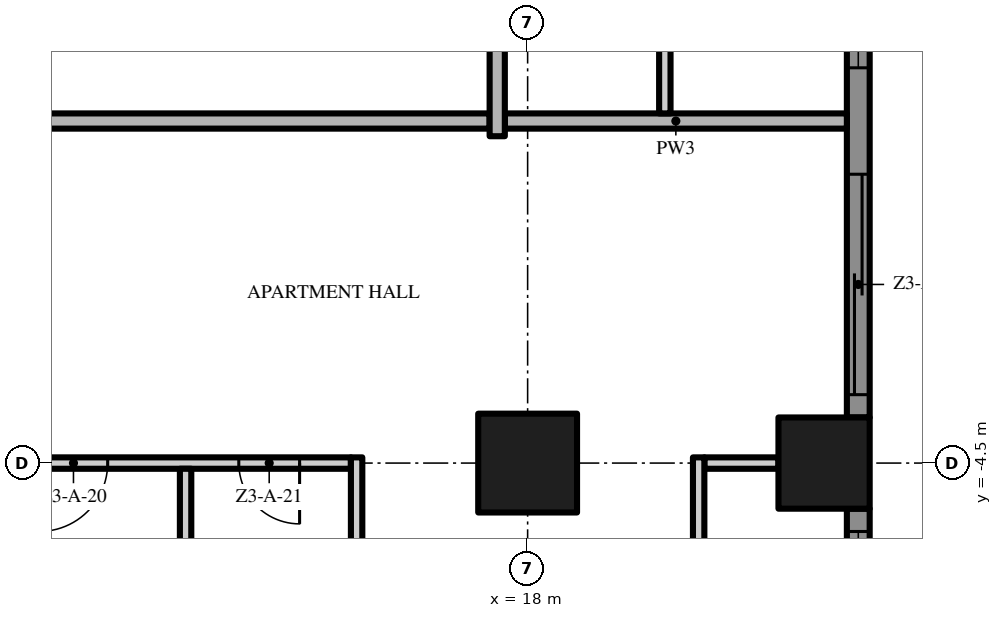
"""IFC4 building model, lengths in metres.
Left out: names, types, materials, properties, quantities, classifications, styles, units other than length and angle.
Written with IfcOpenShell. Run it as: python <this file> out.ifc"""

import sys

from ifc_helpers import new_model, si_unit, direction, frame, frame_2d, origin, origin_2d, place, context, subcontext, project, spatial, polyline, rectangle, outline, extrude, element, fill, save


model = new_model("IFC4")
c1 = context("Model", 3, precision=1e-05, world=origin(), true_north=direction((0.0, 1.0)))
c2 = subcontext(c1, "Body", "Model", "MODEL_VIEW")
j1 = project(units=[si_unit("LENGTHUNIT", "METRE"), si_unit("PLANEANGLEUNIT", "RADIAN")], contexts=[c1])
p1 = place(None, origin())
s1 = spatial("IfcSite", under=j1, at=p1, CompositionType="ELEMENT")
p2 = place(p1, origin())
s2 = spatial("IfcBuilding", under=s1, at=p2, CompositionType="ELEMENT")
p3 = place(p2, frame((0.0, 0.0, 128.8)))
s3 = spatial("IfcBuildingStorey", under=s2, at=p3, CompositionType="ELEMENT", Elevation=128.8)
p4 = place(p3, frame((18.0, -4.5, 0.0), z_axis=(0.0, 0.0, 1.0), x_axis=(1.0, 0.0, 0.0)))
e1 = element("IfcColumn", 1, at=p4, inside=s3, PredefinedType="COLUMN", context=c2, shape_type="SweptSolid", body=[
    extrude(rectangle(XDim=1.3, YDim=1.3, at=origin_2d()), origin(), (0.0, 0.0, 1.0), 3.5),
])
p5 = place(p3, frame((21.9, -4.5, 0.0), z_axis=(0.0, 0.0, 1.0), x_axis=(1.0, 0.0, 0.0)))
e2 = element("IfcColumn", 2, at=p5, inside=s3, PredefinedType="COLUMN", context=c2, shape_type="SweptSolid", body=[
    extrude(rectangle(XDim=1.2, YDim=1.2, at=origin_2d()), origin(), (0.0, 0.0, 1.0), 3.5),
])
p6 = place(p3, frame((22.35, -5.1, 0.0), z_axis=(0.0, 0.0, 1.0), x_axis=(0.0, -1.0, 0.0)))
e3 = element("IfcWall", 3, at=p6, inside=s3, PredefinedType="SOLIDWALL", context=c2, shape_type="SweptSolid", body=[
    extrude(rectangle(XDim=7.2, YDim=0.3, at=frame_2d((3.6, 0.0))), origin(), (0.0, 0.0, 1.0), 3.5),
])
p7 = place(p6, frame((4.6, 0.0, 0.45)))
e4 = element("IfcOpeningElement", 4, at=p7, cuts=e3, PredefinedType="OPENING", context=c2, shape_type="SweptSolid", body=[
    extrude(rectangle(XDim=2.3, YDim=2.65, at=frame_2d((1.15, 1.325))), frame((0.0, 0.16, 0.0), z_axis=(0.0, -1.0, 0.0), x_axis=(1.0, 0.0, 0.0)), (0.0, 0.0, 1.0), 0.32),
])
p8 = place(p6, frame((0.3, 0.0, 0.45)))
e5 = element("IfcOpeningElement", 5, at=p8, cuts=e3, PredefinedType="OPENING", context=c2, shape_type="SweptSolid", body=[
    extrude(rectangle(XDim=2.9, YDim=2.65, at=frame_2d((1.45, 1.325))), frame((0.0, 0.16, 0.0), z_axis=(0.0, -1.0, 0.0), x_axis=(1.0, 0.0, 0.0)), (0.0, 0.0, 1.0), 0.32),
])
p9 = place(p3, frame((22.35, 3.9, 0.0), z_axis=(0.0, 0.0, 1.0), x_axis=(0.0, -1.0, 0.0)))
e6 = element("IfcWall", 6, at=p9, inside=s3, PredefinedType="SOLIDWALL", context=c2, shape_type="SweptSolid", body=[
    extrude(rectangle(XDim=7.8, YDim=0.3, at=frame_2d((3.9, 0.0))), origin(), (0.0, 0.0, 1.0), 3.5),
])
p10 = place(p9, frame((4.6, 0.0, 0.0)))
e7 = element("IfcOpeningElement", 7, at=p10, cuts=e6, PredefinedType="OPENING", context=c2, shape_type="SweptSolid", body=[
    extrude(rectangle(XDim=2.9, YDim=2.4, at=frame_2d((1.45, 1.2))), frame((0.0, 0.16, 0.0), z_axis=(0.0, -1.0, 0.0), x_axis=(1.0, 0.0, 0.0)), (0.0, 0.0, 1.0), 0.32),
])
p11 = place(p9, frame((0.3, 0.0, 0.45)))
e8 = element("IfcOpeningElement", 8, at=p11, cuts=e6, PredefinedType="OPENING", context=c2, shape_type="SweptSolid", body=[
    extrude(rectangle(XDim=2.9, YDim=2.65, at=frame_2d((1.45, 1.325))), frame((0.0, 0.16, 0.0), z_axis=(0.0, -1.0, 0.0), x_axis=(1.0, 0.0, 0.0)), (0.0, 0.0, 1.0), 0.32),
])
p12 = place(p3, origin())
e9 = element("IfcWall", 9, at=p12, inside=s3, PredefinedType="USERDEFINED", context=c2, shape_type="SweptSolid", body=[
    extrude(outline(polyline([(24.3, -13.5), (23.595, -12.0), (23.159, -10.5), (23.1, -9.75), (23.159, -9.0), (23.595, -7.5), (24.3, -6.0), (25.005, -4.5), (25.441, -3.0), (25.5, -2.25), (25.441, -1.5), (25.005, 0.0), (24.3, 1.5), (23.595, 3.0), (23.159, 4.5), (23.1, 5.25), (23.159, 6.0), (23.595, 7.5), (24.3, 9.0), (25.005, 10.5), (25.441, 12.0), (25.5, 12.75), (25.441, 13.5), (25.005, 15.0), (24.3, 16.5), (23.595, 18.0), (23.368, 17.894), (24.074, 16.394), (24.771, 14.911), (25.194, 13.455), (25.249, 12.75), (25.194, 12.045), (24.771, 10.589), (24.074, 9.106), (23.36, 7.589), (22.911, 6.045), (22.849, 5.25), (22.911, 4.455), (23.36, 2.911), (24.074, 1.394), (24.771, -0.089), (25.194, -1.545), (25.249, -2.25), (25.194, -2.955), (24.771, -4.411), (24.074, -5.894), (23.36, -7.411), (22.911, -8.955), (22.849, -9.75), (22.911, -10.545), (23.36, -12.089), (24.074, -13.606), (24.3, -13.5)])), origin(), (0.0, 0.0, 1.0), 0.9),
])
p13 = place(p3, frame((15.675, -4.5, 0.0), z_axis=(0.0, 0.0, 1.0), x_axis=(-1.0, 0.0, 0.0)))
e10 = element("IfcWall", 10, at=p13, inside=s3, PredefinedType="PARTITIONING", context=c2, shape_type="SweptSolid", body=[
    extrude(rectangle(XDim=4.35, YDim=0.15, at=frame_2d((2.175, 0.0))), origin(), (0.0, 0.0, 1.0), 3.5),
])
p14 = place(p13, frame((3.2, 0.0, 0.0)))
e11 = element("IfcOpeningElement", 11, at=p14, cuts=e10, PredefinedType="OPENING", context=c2, shape_type="SweptSolid", body=[
    extrude(rectangle(XDim=0.9, YDim=2.1, at=frame_2d((0.45, 1.05))), frame((0.0, 0.085, 0.0), z_axis=(0.0, -1.0, 0.0), x_axis=(1.0, 0.0, 0.0)), (0.0, 0.0, 1.0), 0.17),
])
p15 = place(p13, frame((0.675, 0.0, 0.0)))
e12 = element("IfcOpeningElement", 12, at=p15, cuts=e10, PredefinedType="OPENING", context=c2, shape_type="SweptSolid", body=[
    extrude(rectangle(XDim=0.8, YDim=2.0, at=frame_2d((0.4, 1.0))), frame((0.0, 0.085, 0.0), z_axis=(0.0, -1.0, 0.0), x_axis=(1.0, 0.0, 0.0)), (0.0, 0.0, 1.0), 0.17),
])
p16 = place(p3, frame((20.325, -4.5, 0.0), z_axis=(0.0, 0.0, 1.0), x_axis=(1.0, 0.0, 0.0)))
e13 = element("IfcWall", 13, at=p16, inside=s3, PredefinedType="PARTITIONING", context=c2, shape_type="SweptSolid", body=[
    extrude(rectangle(XDim=0.975, YDim=0.15, at=frame_2d((0.487, 0.0))), origin(), (0.0, 0.0, 1.0), 3.5),
])
p17 = place(p3, frame((17.5, 0.0, 0.0), z_axis=(0.0, 0.0, 1.0), x_axis=(-1.0, 0.0, 0.0)))
e14 = element("IfcWall", 14, at=p17, inside=s3, PredefinedType="PARTITIONING", context=c2, shape_type="SweptSolid", body=[
    extrude(rectangle(XDim=35.0, YDim=0.2, at=frame_2d((17.5, 0.0))), origin(), (0.0, 0.0, 1.0), 3.5),
])
p18 = place(p17, frame((16.75, 0.0, 0.0)))
e15 = element("IfcOpeningElement", 15, at=p18, cuts=e14, PredefinedType="OPENING", context=c2, shape_type="SweptSolid", body=[
    extrude(rectangle(XDim=1.5, YDim=2.4, at=frame_2d((0.75, 1.2))), frame((0.0, 0.11, 0.0), z_axis=(0.0, -1.0, 0.0), x_axis=(1.0, 0.0, 0.0)), (0.0, 0.0, 1.0), 0.22),
])
p19 = place(p3, frame((17.7, 0.0, 0.0), z_axis=(0.0, 0.0, 1.0), x_axis=(1.0, 0.0, 0.0)))
e16 = element("IfcWall", 16, at=p19, inside=s3, PredefinedType="PARTITIONING", context=c2, shape_type="SweptSolid", body=[
    extrude(rectangle(XDim=4.5, YDim=0.2, at=frame_2d((2.25, 0.0))), origin(), (0.0, 0.0, 1.0), 3.5),
])
p20 = place(p3, frame((13.5, -17.7, 0.0), z_axis=(0.0, 0.0, 1.0), x_axis=(0.0, 1.0, 0.0)))
e17 = element("IfcWall", 17, at=p20, inside=s3, PredefinedType="PARTITIONING", context=c2, shape_type="SweptSolid", body=[
    extrude(rectangle(XDim=13.125, YDim=0.15, at=frame_2d((6.562, 0.0))), origin(), (0.0, 0.0, 1.0), 3.5),
])
p21 = place(p3, frame((15.75, -12.075, 0.0), z_axis=(0.0, 0.0, 1.0), x_axis=(0.0, 1.0, 0.0)))
e18 = element("IfcWall", 18, at=p21, inside=s3, PredefinedType="PARTITIONING", context=c2, shape_type="SweptSolid", body=[
    extrude(rectangle(XDim=7.65, YDim=0.15, at=frame_2d((3.825, 0.0))), origin(), (0.0, 0.0, 1.0), 3.5),
])
p22 = place(p3, frame((17.6, -0.2, 0.0), z_axis=(0.0, 0.0, 1.0), x_axis=(0.0, 1.0, 0.0)))
e19 = element("IfcWall", 19, at=p22, inside=s3, PredefinedType="PARTITIONING", context=c2, shape_type="SweptSolid", body=[
    extrude(rectangle(XDim=4.05, YDim=0.2, at=frame_2d((2.025, 0.0))), origin(), (0.0, 0.0, 1.0), 3.5),
])
p23 = place(p3, frame((19.805, 0.1, 0.0), z_axis=(0.0, 0.0, 1.0), x_axis=(0.0, 1.0, 0.0)))
e20 = element("IfcWall", 20, at=p23, inside=s3, PredefinedType="PARTITIONING", context=c2, shape_type="SweptSolid", body=[
    extrude(rectangle(XDim=2.225, YDim=0.15, at=frame_2d((1.113, 0.0))), origin(), (0.0, 0.0, 1.0), 3.5),
])
p24 = place(p3, frame((20.25, -4.425, 0.0), z_axis=(0.0, 0.0, 1.0), x_axis=(0.0, -1.0, 0.0)))
e21 = element("IfcWall", 21, at=p24, inside=s3, PredefinedType="PARTITIONING", context=c2, shape_type="SweptSolid", body=[
    extrude(rectangle(XDim=4.5, YDim=0.15, at=frame_2d((2.25, 0.0))), origin(), (0.0, 0.0, 1.0), 3.5),
])
p25 = place(p24, frame((1.95, 0.0, 0.0)))
e22 = element("IfcOpeningElement", 22, at=p25, cuts=e21, PredefinedType="OPENING", context=c2, shape_type="SweptSolid", body=[
    extrude(rectangle(XDim=0.8, YDim=2.0, at=frame_2d((0.4, 1.0))), frame((0.0, 0.085, 0.0), z_axis=(0.0, -1.0, 0.0), x_axis=(1.0, 0.0, 0.0)), (0.0, 0.0, 1.0), 0.17),
])
p26 = place(p8, origin())
e23 = element("IfcWindow", 23, at=p26, inside=s3, PartitioningType="SINGLE_PANEL", PredefinedType="WINDOW", context=c2, shape_type="SweptSolid", body=[
    extrude(rectangle(XDim=2.9, YDim=2.65, at=frame_2d((1.45, 1.325))), frame((0.0, 0.03, 0.0), z_axis=(0.0, -1.0, 0.0), x_axis=(1.0, 0.0, 0.0)), (0.0, 0.0, 1.0), 0.06),
])
fill(e5, e23)
p27 = place(p10, origin())
e24 = element("IfcDoor", 24, at=p27, inside=s3, OperationType="SINGLE_SWING_LEFT", PredefinedType="DOOR", context=c2, shape_type="SweptSolid", body=[
    extrude(rectangle(XDim=2.9, YDim=2.4, at=frame_2d((1.45, 1.2))), frame((0.0, 0.025, 0.0), z_axis=(0.0, -1.0, 0.0), x_axis=(1.0, 0.0, 0.0)), (0.0, 0.0, 1.0), 0.05),
])
fill(e7, e24)
p28 = place(p11, origin())
e25 = element("IfcWindow", 25, at=p28, inside=s3, PartitioningType="SINGLE_PANEL", PredefinedType="WINDOW", context=c2, shape_type="SweptSolid", body=[
    extrude(rectangle(XDim=2.9, YDim=2.65, at=frame_2d((1.45, 1.325))), frame((0.0, 0.03, 0.0), z_axis=(0.0, -1.0, 0.0), x_axis=(1.0, 0.0, 0.0)), (0.0, 0.0, 1.0), 0.06),
])
fill(e8, e25)
p29 = place(p14, origin())
e26 = element("IfcDoor", 26, at=p29, inside=s3, OperationType="SINGLE_SWING_RIGHT", PredefinedType="DOOR", context=c2, shape_type="SweptSolid", body=[
    extrude(rectangle(XDim=0.9, YDim=2.1, at=frame_2d((0.45, 1.05))), frame((0.0, 0.025, 0.0), z_axis=(0.0, -1.0, 0.0), x_axis=(1.0, 0.0, 0.0)), (0.0, 0.0, 1.0), 0.05),
])
fill(e11, e26)
p30 = place(p15, origin())
e27 = element("IfcDoor", 27, at=p30, inside=s3, OperationType="SINGLE_SWING_LEFT", PredefinedType="DOOR", context=c2, shape_type="SweptSolid", body=[
    extrude(rectangle(XDim=0.8, YDim=2.0, at=frame_2d((0.4, 1.0))), frame((0.0, 0.025, 0.0), z_axis=(0.0, -1.0, 0.0), x_axis=(1.0, 0.0, 0.0)), (0.0, 0.0, 1.0), 0.05),
])
fill(e12, e27)
save(model, sys.argv[1])
